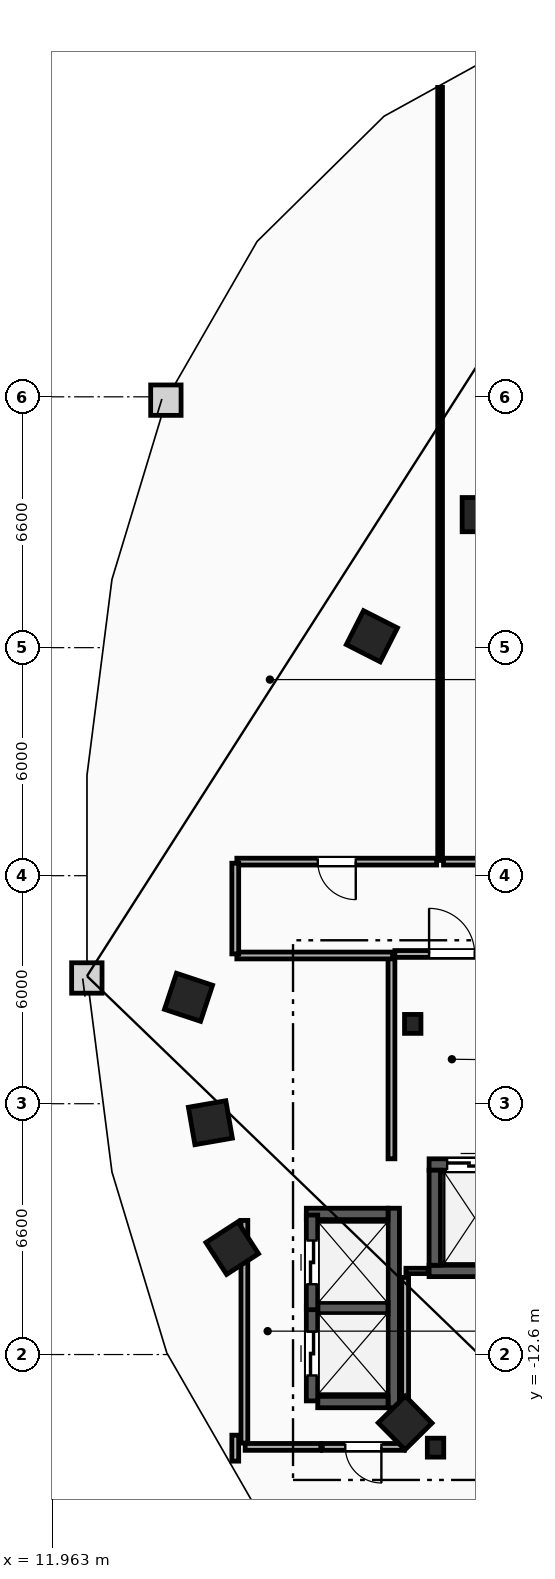
"""IFC4 building model, lengths in metres.
Left out: names, types, materials, properties, quantities, classifications, styles, units other than length and angle.
Written with IfcOpenShell. Run it as: python <this file> out.ifc"""

import sys

from ifc_helpers import new_model, si_unit, direction, frame, frame_2d, origin, origin_2d, place, context, subcontext, project, spatial, rectangle, i_section, extrude, element, fill, save


model = new_model("IFC4")
c1 = context("Model", 3, precision=1e-05, world=origin(), true_north=direction((0.0, 1.0)))
c2 = subcontext(c1, "Body", "Model", "MODEL_VIEW")
j1 = project(units=[si_unit("LENGTHUNIT", "METRE"), si_unit("PLANEANGLEUNIT", "RADIAN")], contexts=[c1])
p1 = place(None, origin())
s1 = spatial("IfcSite", under=j1, at=p1, CompositionType="ELEMENT")
p2 = place(p1, origin())
s2 = spatial("IfcBuilding", under=s1, at=p2, CompositionType="ELEMENT")
p3 = place(p2, frame((0.0, 0.0, 180.0)))
s3 = spatial("IfcBuildingStorey", under=s2, at=p3, CompositionType="ELEMENT", Elevation=180.0)
for number, where, z_axis, x_axis in (
    (1, (21.45, -3.9, 0.0), (0.0, 0.0, 1.0), (1.0, 0.0, 0.0)),
    (2, (22.05, -15.05, 0.0), (0.0, 0.0, 1.0), (1.0, 0.0, 0.0)),
):
    element("IfcColumn", number, at=place(p3, frame(where, z_axis=z_axis, x_axis=x_axis)), inside=s3, PredefinedType="COLUMN", context=c2, shape_type="SweptSolid", body=[
        extrude(i_section(OverallWidth=0.432, OverallDepth=0.498, WebThickness=0.056, FlangeThickness=0.089, FilletRadius=0.018, at=origin_2d()), origin(), (0.0, 0.0, 1.0), 3.6),
    ])
p4 = place(p3, frame((23.2, 9.5, 0.0), z_axis=(0.0, 0.0, 1.0), x_axis=(1.0, 0.0, 0.0)))
e3 = element("IfcColumn", 3, at=p4, inside=s3, PredefinedType="COLUMN", context=c2, shape_type="SweptSolid", body=[
    extrude(rectangle(XDim=0.9, YDim=0.9, at=origin_2d()), origin(), (0.0, 0.0, 1.0), 3.6),
])
for number, where, z_axis, x_axis in (
    (4, (15.55, -3.2, 0.0), (0.0, 0.0, 1.0), (-0.315, -0.949, 0.0)),
    (5, (16.125, -6.5, 0.0), (0.0, 0.0, 1.0), (0.172, -0.985, 0.0)),
    (6, (16.7, -9.8, 0.0), (0.0, 0.0, 1.0), (0.544, -0.839, 0.0)),
    (7, (21.25, -14.4, 0.0), (0.0, 0.0, 1.0), (0.703, -0.711, 0.0)),
    (8, (20.375, 6.3, 0.0), (0.0, 0.0, 1.0), (-0.453, -0.892, 0.0)),
):
    element("IfcColumn", number, at=place(p3, frame(where, z_axis=z_axis, x_axis=x_axis)), inside=s3, PredefinedType="COLUMN", context=c2, shape_type="SweptSolid", body=[
        extrude(rectangle(XDim=1.0, YDim=1.0, at=origin_2d()), origin(), (0.0, 0.0, 1.0), 3.6),
    ])
p5 = place(p3, frame((20.89, -7.45, 0.0), z_axis=(0.0, 0.0, 1.0), x_axis=(0.0, 1.0, 0.0)))
e9 = element("IfcWall", 9, at=p5, inside=s3, PredefinedType="PARTITIONING", context=c2, shape_type="SweptSolid", body=[
    extrude(rectangle(XDim=5.3, YDim=0.18, at=frame_2d((2.65, 0.0))), origin(), (0.0, 0.0, 1.0), 3.36),
])
p6 = place(p3, frame((20.98, -2.06, 0.0), z_axis=(0.0, 0.0, 1.0), x_axis=(1.0, 0.0, 0.0)))
e10 = element("IfcWall", 10, at=p6, inside=s3, PredefinedType="PARTITIONING", context=c2, shape_type="SweptSolid", body=[
    extrude(rectangle(XDim=3.0, YDim=0.18, at=frame_2d((1.5, 0.0))), origin(), (0.0, 0.0, 1.0), 3.36),
])
p7 = place(p6, frame((0.9, 0.0, 0.0)))
e11 = element("IfcOpeningElement", 11, at=p7, cuts=e10, PredefinedType="OPENING", context=c2, shape_type="SweptSolid", body=[
    extrude(rectangle(XDim=1.2, YDim=2.15, at=frame_2d((0.6, 1.075))), frame((0.0, 0.1, 0.0), z_axis=(0.0, -1.0, 0.0), x_axis=(1.0, 0.0, 0.0)), (0.0, 0.0, 1.0), 0.2),
])
p8 = place(p3, frame((21.88, -7.6, 0.0), z_axis=(0.0, 0.0, 1.0), x_axis=(1.0, 0.0, 0.0)))
e12 = element("IfcWall", 12, at=p8, inside=s3, PredefinedType="SHEAR", context=c2, shape_type="SweptSolid", body=[
    extrude(rectangle(XDim=2.1, YDim=0.3, at=frame_2d((1.05, 0.0))), origin(), (0.0, 0.0, 1.0), 3.36),
])
p9 = place(p8, frame((0.475, 0.0, 0.0)))
e13 = element("IfcOpeningElement", 13, at=p9, cuts=e12, PredefinedType="OPENING", context=c2, shape_type="SweptSolid", body=[
    extrude(rectangle(XDim=1.15, YDim=2.2, at=frame_2d((0.575, 1.1))), frame((0.0, 0.16, 0.0), z_axis=(0.0, -1.0, 0.0), x_axis=(1.0, 0.0, 0.0)), (0.0, 0.0, 1.0), 0.32),
])
p10 = place(p3, frame((21.88, -10.4, 0.0), z_axis=(0.0, 0.0, 1.0), x_axis=(1.0, 0.0, 0.0)))
e14 = element("IfcWall", 14, at=p10, inside=s3, PredefinedType="SHEAR", context=c2, shape_type="SweptSolid", body=[
    extrude(rectangle(XDim=2.1, YDim=0.3, at=frame_2d((1.05, 0.0))), origin(), (0.0, 0.0, 1.0), 3.36),
])
p11 = place(p3, frame((22.03, -10.25, 0.0), z_axis=(0.0, 0.0, 1.0), x_axis=(0.0, 1.0, 0.0)))
e15 = element("IfcWall", 15, at=p11, inside=s3, PredefinedType="SHEAR", context=c2, shape_type="SweptSolid", body=[
    extrude(rectangle(XDim=2.5, YDim=0.3, at=frame_2d((1.25, 0.0))), origin(), (0.0, 0.0, 1.0), 3.36),
])
p12 = place(p3, frame((20.95, -14.0, 0.0), z_axis=(0.0, 0.0, 1.0), x_axis=(0.0, 1.0, 0.0)))
e16 = element("IfcWall", 16, at=p12, inside=s3, PredefinedType="SHEAR", context=c2, shape_type="SweptSolid", body=[
    extrude(rectangle(XDim=5.25, YDim=0.3, at=frame_2d((2.625, 0.0))), origin(), (0.0, 0.0, 1.0), 3.36),
])
p13 = place(p3, frame((18.95, -13.85, 0.0), z_axis=(0.0, 0.0, 1.0), x_axis=(1.0, 0.0, 0.0)))
e17 = element("IfcWall", 17, at=p13, inside=s3, PredefinedType="SHEAR", context=c2, shape_type="SweptSolid", body=[
    extrude(rectangle(XDim=1.85, YDim=0.3, at=frame_2d((0.925, 0.0))), origin(), (0.0, 0.0, 1.0), 3.36),
])
p14 = place(p3, frame((18.65, -8.9, 0.0), z_axis=(0.0, 0.0, 1.0), x_axis=(1.0, 0.0, 0.0)))
e18 = element("IfcWall", 18, at=p14, inside=s3, PredefinedType="SHEAR", context=c2, shape_type="SweptSolid", body=[
    extrude(rectangle(XDim=2.15, YDim=0.3, at=frame_2d((1.075, 0.0))), origin(), (0.0, 0.0, 1.0), 3.36),
])
p15 = place(p3, frame((18.95, -11.375, 0.0), z_axis=(0.0, 0.0, 1.0), x_axis=(1.0, 0.0, 0.0)))
e19 = element("IfcWall", 19, at=p15, inside=s3, PredefinedType="SHEAR", context=c2, shape_type="SweptSolid", body=[
    extrude(rectangle(XDim=1.85, YDim=0.3, at=frame_2d((0.925, 0.0))), origin(), (0.0, 0.0, 1.0), 3.36),
])
p16 = place(p3, frame((18.8, -13.82, 0.0), z_axis=(0.0, 0.0, 1.0), x_axis=(0.0, 1.0, 0.0)))
e20 = element("IfcWall", 20, at=p16, inside=s3, PredefinedType="SHEAR", context=c2, shape_type="SweptSolid", body=[
    extrude(rectangle(XDim=2.49, YDim=0.3, at=frame_2d((1.245, 0.0))), origin(), (0.0, 0.0, 1.0), 3.36),
])
p17 = place(p16, frame((0.67, 0.0, 0.0)))
e21 = element("IfcOpeningElement", 21, at=p17, cuts=e20, PredefinedType="OPENING", context=c2, shape_type="SweptSolid", body=[
    extrude(rectangle(XDim=1.15, YDim=2.2, at=frame_2d((0.575, 1.1))), frame((0.0, 0.16, 0.0), z_axis=(0.0, -1.0, 0.0), x_axis=(1.0, 0.0, 0.0)), (0.0, 0.0, 1.0), 0.32),
])
p18 = place(p3, frame((18.8, -11.42, 0.0), z_axis=(0.0, 0.0, 1.0), x_axis=(0.0, 1.0, 0.0)))
e22 = element("IfcWall", 22, at=p18, inside=s3, PredefinedType="SHEAR", context=c2, shape_type="SweptSolid", body=[
    extrude(rectangle(XDim=2.49, YDim=0.3, at=frame_2d((1.245, 0.0))), origin(), (0.0, 0.0, 1.0), 3.36),
])
p19 = place(p18, frame((0.67, 0.0, 0.0)))
e23 = element("IfcOpeningElement", 23, at=p19, cuts=e22, PredefinedType="OPENING", context=c2, shape_type="SweptSolid", body=[
    extrude(rectangle(XDim=1.15, YDim=2.2, at=frame_2d((0.575, 1.1))), frame((0.0, 0.16, 0.0), z_axis=(0.0, -1.0, 0.0), x_axis=(1.0, 0.0, 0.0)), (0.0, 0.0, 1.0), 0.32),
])
p20 = place(p3, frame((17.02, -14.93, 0.0), z_axis=(0.0, 0.0, 1.0), x_axis=(0.0, 1.0, 0.0)))
e24 = element("IfcWall", 24, at=p20, inside=s3, PredefinedType="PARTITIONING", context=c2, shape_type="SweptSolid", body=[
    extrude(rectangle(XDim=5.86, YDim=0.18, at=frame_2d((2.93, 0.0))), origin(), (0.0, 0.0, 1.0), 3.36),
])
p21 = place(p3, frame((17.04, -15.03, 0.0), z_axis=(0.0, 0.0, 1.0), x_axis=(1.0, 0.0, 0.0)))
e25 = element("IfcWall", 25, at=p21, inside=s3, PredefinedType="PARTITIONING", context=c2, shape_type="SweptSolid", body=[
    extrude(rectangle(XDim=1.99, YDim=0.18, at=frame_2d((0.995, 0.0))), origin(), (0.0, 0.0, 1.0), 3.36),
])
p22 = place(p3, frame((21.23, -15.03, 0.0), z_axis=(0.0, 0.0, 1.0), x_axis=(-1.0, 0.0, 0.0)))
e26 = element("IfcWall", 26, at=p22, inside=s3, PredefinedType="PARTITIONING", context=c2, shape_type="SweptSolid", body=[
    extrude(rectangle(XDim=2.16, YDim=0.18, at=frame_2d((1.08, 0.0))), origin(), (0.0, 0.0, 1.0), 3.36),
])
p23 = place(p22, frame((0.605, 0.0, 0.0)))
e27 = element("IfcOpeningElement", 27, at=p23, cuts=e26, PredefinedType="OPENING", context=c2, shape_type="SweptSolid", body=[
    extrude(rectangle(XDim=0.95, YDim=2.1, at=frame_2d((0.475, 1.05))), frame((0.0, 0.1, 0.0), z_axis=(0.0, -1.0, 0.0), x_axis=(1.0, 0.0, 0.0)), (0.0, 0.0, 1.0), 0.2),
])
p24 = place(p3, frame((21.27, -10.4, 0.0), z_axis=(0.0, 0.0, 1.0), x_axis=(1.0, 0.0, 0.0)))
e28 = element("IfcWall", 28, at=p24, inside=s3, PredefinedType="PARTITIONING", context=c2, shape_type="SweptSolid", body=[
    extrude(rectangle(XDim=0.59, YDim=0.14, at=frame_2d((0.295, 0.0))), origin(), (0.0, 0.0, 1.0), 3.36),
])
p25 = place(p3, frame((21.25, -14.93, 0.0), z_axis=(0.0, 0.0, 1.0), x_axis=(0.0, 1.0, 0.0)))
e29 = element("IfcWall", 29, at=p25, inside=s3, PredefinedType="PARTITIONING", context=c2, shape_type="SweptSolid", body=[
    extrude(rectangle(XDim=4.36, YDim=0.18, at=frame_2d((2.18, 0.0))), origin(), (0.0, 0.0, 1.0), 3.36),
])
p26 = place(p3, frame((22.17, 0.4, 0.0), z_axis=(0.0, 0.0, 1.0), x_axis=(0.0, 1.0, 0.0)))
e30 = element("IfcWall", 30, at=p26, inside=s3, PredefinedType="PARTITIONING", context=c2, shape_type="SweptSolid", body=[
    extrude(rectangle(XDim=20.342, YDim=0.125, at=frame_2d((10.171, 0.0))), origin(), (0.0, 0.0, 1.0), 2.665),
])
p27 = place(p3, frame((22.08, 0.37, 0.0), z_axis=(0.0, 0.0, 1.0), x_axis=(-1.0, 0.0, 0.0)))
e31 = element("IfcWall", 31, at=p27, inside=s3, PredefinedType="PARTITIONING", context=c2, shape_type="SweptSolid", body=[
    extrude(rectangle(XDim=5.259, YDim=0.18, at=frame_2d((2.629, 0.0))), origin(), (0.0, 0.0, 1.0), 3.36),
])
p28 = place(p27, frame((2.129, 0.0, 0.0)))
e32 = element("IfcOpeningElement", 32, at=p28, cuts=e31, PredefinedType="OPENING", context=c2, shape_type="SweptSolid", body=[
    extrude(rectangle(XDim=1.0, YDim=2.15, at=frame_2d((0.5, 1.075))), frame((0.0, 0.1, 0.0), z_axis=(0.0, -1.0, 0.0), x_axis=(1.0, 0.0, 0.0)), (0.0, 0.0, 1.0), 0.2),
])
p29 = place(p3, frame((16.822, -2.1, 0.0), z_axis=(0.0, 0.0, 1.0), x_axis=(1.0, 0.0, 0.0)))
e33 = element("IfcWall", 33, at=p29, inside=s3, PredefinedType="PARTITIONING", context=c2, shape_type="SweptSolid", body=[
    extrude(rectangle(XDim=4.098, YDim=0.18, at=frame_2d((2.049, 0.0))), origin(), (0.0, 0.0, 1.0), 3.36),
])
p30 = place(p3, frame((16.78, 0.329, 0.0), z_axis=(0.0, 0.0, 1.0), x_axis=(0.0, -1.0, 0.0)))
e34 = element("IfcWall", 34, at=p30, inside=s3, PredefinedType="PARTITIONING", context=c2, shape_type="SweptSolid", body=[
    extrude(rectangle(XDim=2.387, YDim=0.18, at=frame_2d((1.194, 0.0))), origin(), (0.0, 0.0, 1.0), 3.36),
])
p31 = place(p3, frame((16.78, -14.721, 0.0), z_axis=(0.0, 0.0, 1.0), x_axis=(0.0, -1.0, 0.0)))
e35 = element("IfcWall", 35, at=p31, inside=s3, PredefinedType="PARTITIONING", context=c2, shape_type="SweptSolid", body=[
    extrude(rectangle(XDim=0.684, YDim=0.18, at=frame_2d((0.342, 0.0))), origin(), (0.0, 0.0, 1.0), 3.36),
])
p32 = place(p3, frame((25.4, 0.37, 0.0), z_axis=(0.0, 0.0, 1.0), x_axis=(-1.0, 0.0, 0.0)))
e36 = element("IfcWall", 36, at=p32, inside=s3, PredefinedType="PARTITIONING", context=c2, shape_type="SweptSolid", body=[
    extrude(rectangle(XDim=3.14, YDim=0.18, at=frame_2d((1.57, 0.0))), origin(), (0.0, 0.0, 1.0), 3.36),
])
p33 = place(p7, origin())
e37 = element("IfcDoor", 37, at=p33, inside=s3, OperationType="SINGLE_SWING_LEFT", PredefinedType="DOOR", context=c2, shape_type="SweptSolid", body=[
    extrude(rectangle(XDim=1.2, YDim=2.15, at=frame_2d((0.6, 1.075))), frame((0.0, 0.025, 0.0), z_axis=(0.0, -1.0, 0.0), x_axis=(1.0, 0.0, 0.0)), (0.0, 0.0, 1.0), 0.05),
])
fill(e11, e37)
p34 = place(p9, origin())
e38 = element("IfcDoor", 38, at=p34, inside=s3, OperationType="SLIDING_TO_LEFT", PredefinedType="TRAPDOOR", context=c2, shape_type="SweptSolid", body=[
    extrude(rectangle(XDim=1.15, YDim=2.2, at=frame_2d((0.575, 1.1))), frame((0.0, 0.025, 0.0), z_axis=(0.0, -1.0, 0.0), x_axis=(1.0, 0.0, 0.0)), (0.0, 0.0, 1.0), 0.05),
])
fill(e13, e38)
p35 = place(p17, origin())
e39 = element("IfcDoor", 39, at=p35, inside=s3, OperationType="SLIDING_TO_LEFT", PredefinedType="TRAPDOOR", context=c2, shape_type="SweptSolid", body=[
    extrude(rectangle(XDim=1.15, YDim=2.2, at=frame_2d((0.575, 1.1))), frame((0.0, 0.025, 0.0), z_axis=(0.0, -1.0, 0.0), x_axis=(1.0, 0.0, 0.0)), (0.0, 0.0, 1.0), 0.05),
])
fill(e21, e39)
p36 = place(p19, origin())
e40 = element("IfcDoor", 40, at=p36, inside=s3, OperationType="SLIDING_TO_LEFT", PredefinedType="TRAPDOOR", context=c2, shape_type="SweptSolid", body=[
    extrude(rectangle(XDim=1.15, YDim=2.2, at=frame_2d((0.575, 1.1))), frame((0.0, 0.025, 0.0), z_axis=(0.0, -1.0, 0.0), x_axis=(1.0, 0.0, 0.0)), (0.0, 0.0, 1.0), 0.05),
])
fill(e23, e40)
p37 = place(p28, origin())
e41 = element("IfcDoor", 41, at=p37, inside=s3, OperationType="SINGLE_SWING_LEFT", PredefinedType="DOOR", context=c2, shape_type="SweptSolid", body=[
    extrude(rectangle(XDim=1.0, YDim=2.15, at=frame_2d((0.5, 1.075))), frame((0.0, 0.025, 0.0), z_axis=(0.0, -1.0, 0.0), x_axis=(1.0, 0.0, 0.0)), (0.0, 0.0, 1.0), 0.05),
])
fill(e32, e41)
p38 = place(p23, origin())
e42 = element("IfcDoor", 42, at=p38, inside=s3, OperationType="SINGLE_SWING_LEFT", PredefinedType="DOOR", context=c2, shape_type="SweptSolid", body=[
    extrude(rectangle(XDim=0.95, YDim=2.1, at=frame_2d((0.475, 1.05))), frame((0.0, 0.025, 0.0), z_axis=(0.0, -1.0, 0.0), x_axis=(1.0, 0.0, 0.0)), (0.0, 0.0, 1.0), 0.05),
])
fill(e27, e42)
save(model, sys.argv[1])
